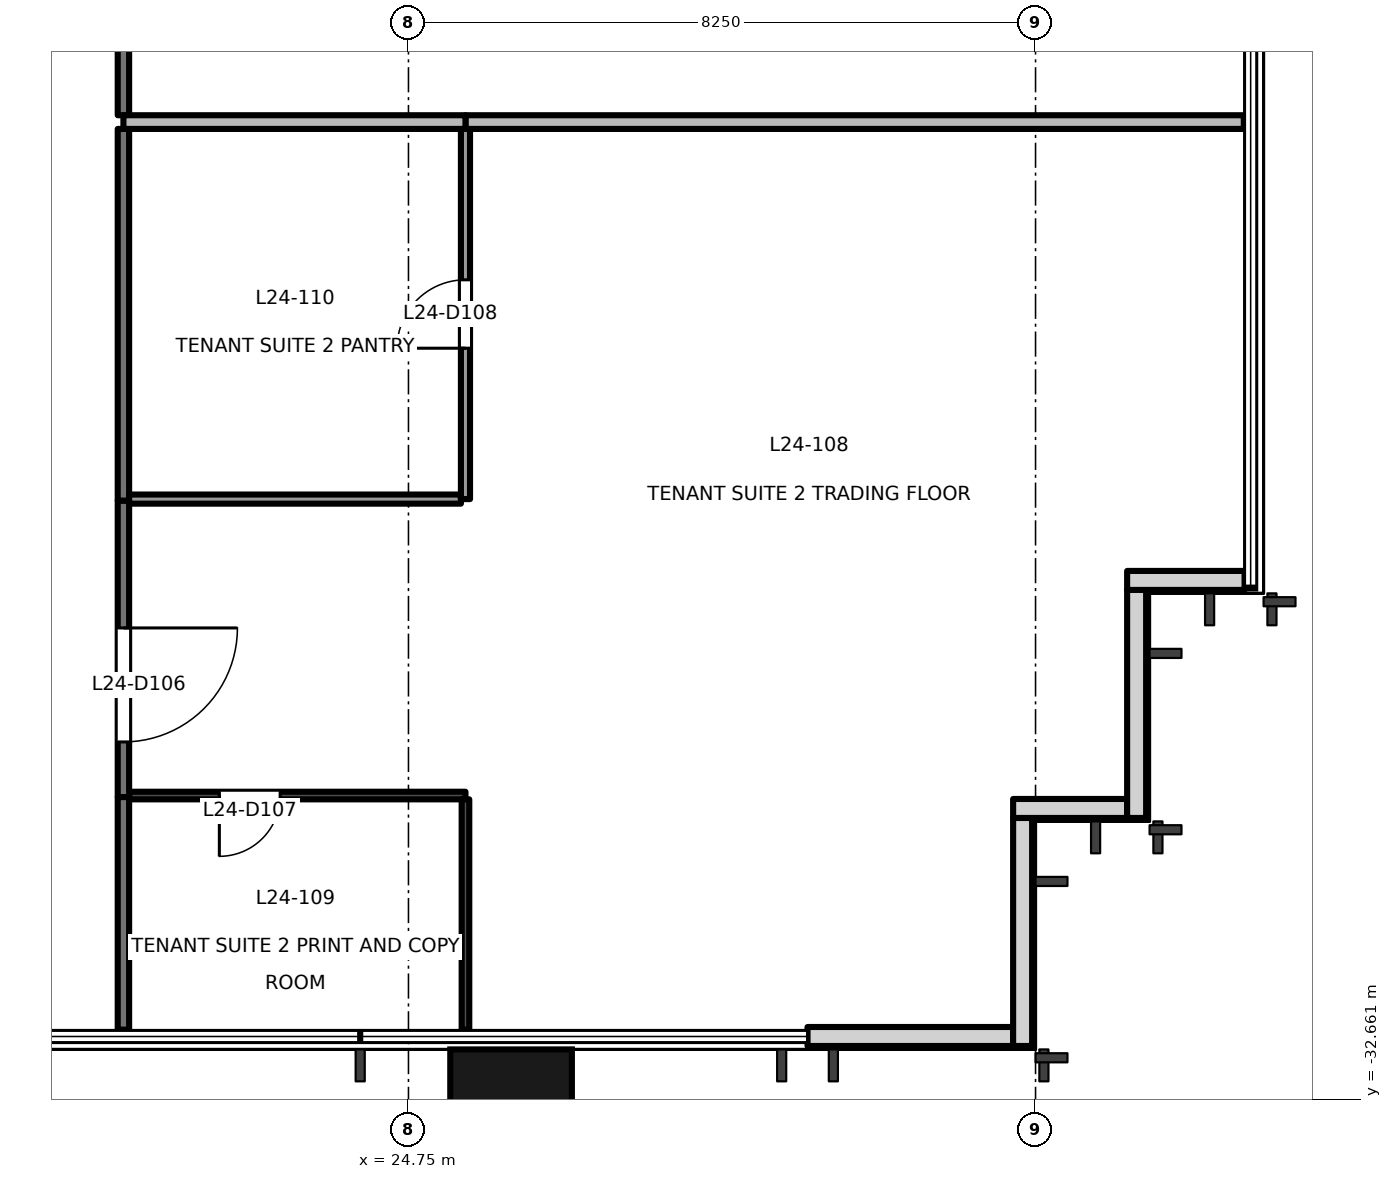
"""IFC4 building model, lengths in metres.
Left out: names, types, materials, properties, quantities, classifications, styles, units other than length and angle.
Written with IfcOpenShell. Run it as: python <this file> out.ifc"""

import sys

from ifc_helpers import new_model, si_unit, direction, frame, frame_2d, origin, origin_2d, place, context, subcontext, project, spatial, rectangle, extrude, element, fill, save


model = new_model("IFC4")
c1 = context("Model", 3, precision=1e-05, world=origin(), true_north=direction((0.0, 1.0)))
c2 = subcontext(c1, "Body", "Model", "MODEL_VIEW")
j1 = project(units=[si_unit("LENGTHUNIT", "METRE"), si_unit("PLANEANGLEUNIT", "RADIAN")], contexts=[c1])
p1 = place(None, origin())
s1 = spatial("IfcSite", under=j1, at=p1, CompositionType="ELEMENT")
p2 = place(p1, origin())
s2 = spatial("IfcBuilding", under=s1, at=p2, CompositionType="ELEMENT")
p3 = place(p2, frame((0.0, 0.0, 107.7)))
s3 = spatial("IfcBuildingStorey", under=s2, at=p3, CompositionType="ELEMENT", Elevation=107.7)
p4 = place(p3, frame((26.1, -32.9, -0.2), z_axis=(0.0, 0.0, 1.0), x_axis=(1.0, 0.0, 0.0)))
e1 = element("IfcColumn", 1, at=p4, inside=s3, PredefinedType="COLUMN", context=c2, shape_type="SweptSolid", body=[
    extrude(rectangle(XDim=1.6, YDim=1.8, at=origin_2d()), origin(), (0.0, 0.0, 1.0), 4.0),
])
p5 = place(p3, frame((30.0, -31.83, 0.0), z_axis=(0.0, 0.0, 1.0), x_axis=(1.0, 0.0, 0.0)))
e2 = element("IfcWall", 2, at=p5, inside=s3, PredefinedType="SOLIDWALL", context=c2, shape_type="SweptSolid", body=[
    extrude(rectangle(XDim=2.705, YDim=0.25, at=frame_2d((1.353, 0.0))), origin(), (0.0, 0.0, 1.0), 3.8),
])
p6 = place(p3, frame((32.83, -31.955, 0.0), z_axis=(0.0, 0.0, 1.0), x_axis=(0.0, 1.0, 0.0)))
e3 = element("IfcWall", 3, at=p6, inside=s3, PredefinedType="SOLIDWALL", context=c2, shape_type="SweptSolid", body=[
    extrude(rectangle(XDim=3.0, YDim=0.25, at=frame_2d((1.5, 0.0))), origin(), (0.0, 0.0, 1.0), 3.8),
])
p7 = place(p3, frame((32.705, -28.83, 0.0), z_axis=(0.0, 0.0, 1.0), x_axis=(1.0, 0.0, 0.0)))
e4 = element("IfcWall", 4, at=p7, inside=s3, PredefinedType="SOLIDWALL", context=c2, shape_type="SweptSolid", body=[
    extrude(rectangle(XDim=1.5, YDim=0.25, at=frame_2d((0.75, 0.0))), origin(), (0.0, 0.0, 1.0), 3.8),
])
p8 = place(p3, frame((34.33, -28.955, 0.0), z_axis=(0.0, 0.0, 1.0), x_axis=(0.0, 1.0, 0.0)))
e5 = element("IfcWall", 5, at=p8, inside=s3, PredefinedType="SOLIDWALL", context=c2, shape_type="SweptSolid", body=[
    extrude(rectangle(XDim=3.0, YDim=0.25, at=frame_2d((1.5, 0.0))), origin(), (0.0, 0.0, 1.0), 3.8),
])
p9 = place(p3, frame((34.205, -25.83, 0.0), z_axis=(0.0, 0.0, 1.0), x_axis=(1.0, 0.0, 0.0)))
e6 = element("IfcWall", 6, at=p9, inside=s3, PredefinedType="SOLIDWALL", context=c2, shape_type="SweptSolid", body=[
    extrude(rectangle(XDim=1.545, YDim=0.25, at=frame_2d((0.772, 0.0))), origin(), (0.0, 0.0, 1.0), 3.8),
])
p10 = place(p3, frame((21.0, -24.78, 0.0), z_axis=(0.0, 0.0, 1.0), x_axis=(0.0, -1.0, 0.0)))
e7 = element("IfcWall", 7, at=p10, inside=s3, PredefinedType="PARTITIONING", context=c2, shape_type="SweptSolid", body=[
    extrude(rectangle(XDim=3.9, YDim=0.15, at=frame_2d((1.95, 0.0))), origin(), (0.0, 0.0, 1.0), 3.8),
])
p11 = place(p10, frame((1.675, 0.0, 0.0)))
e8 = element("IfcOpeningElement", 8, at=p11, cuts=e7, PredefinedType="OPENING", context=c2, shape_type="SweptSolid", body=[
    extrude(rectangle(XDim=1.5, YDim=2.1, at=frame_2d((0.75, 1.05))), frame((0.0, 0.085, 0.0), z_axis=(0.0, -1.0, 0.0), x_axis=(1.0, 0.0, 0.0)), (0.0, 0.0, 1.0), 0.171),
])
p12 = place(p3, frame((21.0, -28.68, 0.0), z_axis=(0.0, 0.0, 1.0), x_axis=(0.0, -1.0, 0.0)))
e9 = element("IfcWall", 9, at=p12, inside=s3, PredefinedType="PARTITIONING", context=c2, shape_type="SweptSolid", body=[
    extrude(rectangle(XDim=3.06, YDim=0.15, at=frame_2d((1.53, 0.0))), origin(), (0.0, 0.0, 1.0), 3.8),
])
p13 = place(p3, frame((21.0, -19.89, 0.0), z_axis=(0.0, 0.0, 1.0), x_axis=(0.0, -1.0, 0.0)))
e10 = element("IfcWall", 10, at=p13, inside=s3, PredefinedType="PARTITIONING", context=c2, shape_type="SweptSolid", body=[
    extrude(rectangle(XDim=4.89, YDim=0.15, at=frame_2d((2.445, 0.0))), origin(), (0.0, 0.0, 1.0), 3.8),
])
p14 = place(p3, frame((21.0, -15.32, 0.0), z_axis=(0.0, 0.0, 1.0), x_axis=(0.0, -1.0, 0.0)))
e11 = element("IfcWall", 11, at=p14, inside=s3, PredefinedType="PARTITIONING", context=c2, shape_type="SweptSolid", body=[
    extrude(rectangle(XDim=4.39, YDim=0.15, at=frame_2d((2.195, 0.0))), origin(), (0.0, 0.0, 1.0), 3.8),
])
p15 = place(p14, frame((1.745, 0.0, 0.0)))
e12 = element("IfcOpeningElement", 12, at=p15, cuts=e11, PredefinedType="OPENING", context=c2, shape_type="SweptSolid", body=[
    extrude(rectangle(XDim=0.9, YDim=2.1, at=frame_2d((0.45, 1.05))), frame((0.0, 0.085, 0.0), z_axis=(0.0, -1.0, 0.0), x_axis=(1.0, 0.0, 0.0)), (0.0, 0.0, 1.0), 0.171),
])
p16 = place(p3, frame((25.5, -28.66, 0.0), z_axis=(0.0, 0.0, 1.0), x_axis=(-1.0, 0.0, 0.0)))
e13 = element("IfcWall", 13, at=p16, inside=s3, PredefinedType="PARTITIONING", context=c2, shape_type="SweptSolid", body=[
    extrude(rectangle(XDim=4.425, YDim=0.1, at=frame_2d((2.212, 0.0))), origin(), (0.0, 0.0, 1.0), 3.8),
])
p17 = place(p16, frame((2.438, 0.0, 0.0)))
e14 = element("IfcOpeningElement", 14, at=p17, cuts=e13, PredefinedType="OPENING", context=c2, shape_type="SweptSolid", body=[
    extrude(rectangle(XDim=0.8, YDim=2.1, at=frame_2d((0.4, 1.05))), frame((0.0, 0.061, 0.0), z_axis=(0.0, -1.0, 0.0), x_axis=(1.0, 0.0, 0.0)), (0.0, 0.0, 1.0), 0.121),
])
p18 = place(p3, frame((25.5, -31.74, 0.0), z_axis=(0.0, 0.0, 1.0), x_axis=(0.0, 1.0, 0.0)))
e15 = element("IfcWall", 15, at=p18, inside=s3, PredefinedType="PARTITIONING", context=c2, shape_type="SweptSolid", body=[
    extrude(rectangle(XDim=3.03, YDim=0.1, at=frame_2d((1.515, 0.0))), origin(), (0.0, 0.0, 1.0), 3.8),
])
p19 = place(p3, frame((21.075, -24.76, 0.0), z_axis=(0.0, 0.0, 1.0), x_axis=(1.0, 0.0, 0.0)))
e16 = element("IfcWall", 16, at=p19, inside=s3, PredefinedType="PARTITIONING", context=c2, shape_type="SweptSolid", body=[
    extrude(rectangle(XDim=4.365, YDim=0.12, at=frame_2d((2.183, 0.0))), origin(), (0.0, 0.0, 1.0), 3.8),
])
p20 = place(p3, frame((25.5, -24.76, 0.0), z_axis=(0.0, 0.0, 1.0), x_axis=(0.0, 1.0, 0.0)))
e17 = element("IfcWall", 17, at=p20, inside=s3, PredefinedType="PARTITIONING", context=c2, shape_type="SweptSolid", body=[
    extrude(rectangle(XDim=4.87, YDim=0.12, at=frame_2d((2.435, 0.0))), origin(), (0.0, 0.0, 1.0), 3.8),
])
p21 = place(p20, frame((1.985, 0.0, 0.0)))
e18 = element("IfcOpeningElement", 18, at=p21, cuts=e17, PredefinedType="OPENING", context=c2, shape_type="SweptSolid", body=[
    extrude(rectangle(XDim=0.9, YDim=2.1, at=frame_2d((0.45, 1.05))), frame((0.0, 0.071, 0.0), z_axis=(0.0, -1.0, 0.0), x_axis=(1.0, 0.0, 0.0)), (0.0, 0.0, 1.0), 0.141),
])
p22 = place(p3, frame((25.5, -19.8, 0.0), z_axis=(0.0, 0.0, 1.0), x_axis=(1.0, 0.0, 0.0)))
e19 = element("IfcWall", 19, at=p22, inside=s3, PredefinedType="PARTITIONING", context=c2, shape_type="SweptSolid", body=[
    extrude(rectangle(XDim=10.24, YDim=0.18, at=frame_2d((5.12, 0.0))), origin(), (0.0, 0.0, 1.0), 3.8),
])
p23 = place(p3, frame((21.0, -19.8, 0.0), z_axis=(0.0, 0.0, 1.0), x_axis=(1.0, 0.0, 0.0)))
e20 = element("IfcWall", 20, at=p23, inside=s3, PredefinedType="PARTITIONING", context=c2, shape_type="SweptSolid", body=[
    extrude(rectangle(XDim=4.5, YDim=0.18, at=frame_2d((2.25, 0.0))), origin(), (0.0, 0.0, 1.0), 3.8),
])
p24 = place(p11, origin())
e21 = element("IfcDoor", 21, at=p24, inside=s3, OperationType="DOUBLE_DOOR_SINGLE_SWING", PredefinedType="DOOR", context=c2, shape_type="SweptSolid", body=[
    extrude(rectangle(XDim=1.5, YDim=2.1, at=frame_2d((0.75, 1.05))), frame((0.0, 0.025, 0.0), z_axis=(0.0, -1.0, 0.0), x_axis=(1.0, 0.0, 0.0)), (0.0, 0.0, 1.0), 0.05),
])
fill(e8, e21)
p25 = place(p17, origin())
e22 = element("IfcDoor", 22, at=p25, inside=s3, OperationType="SINGLE_SWING_RIGHT", PredefinedType="DOOR", context=c2, shape_type="SweptSolid", body=[
    extrude(rectangle(XDim=0.8, YDim=2.1, at=frame_2d((0.4, 1.05))), frame((0.0, 0.025, 0.0), z_axis=(0.0, -1.0, 0.0), x_axis=(1.0, 0.0, 0.0)), (0.0, 0.0, 1.0), 0.05),
])
fill(e14, e22)
p26 = place(p21, origin())
e23 = element("IfcDoor", 23, at=p26, inside=s3, OperationType="SINGLE_SWING_LEFT", PredefinedType="DOOR", context=c2, shape_type="SweptSolid", body=[
    extrude(rectangle(XDim=0.9, YDim=2.1, at=frame_2d((0.45, 1.05))), frame((0.0, 0.025, 0.0), z_axis=(0.0, -1.0, 0.0), x_axis=(1.0, 0.0, 0.0)), (0.0, 0.0, 1.0), 0.05),
])
fill(e18, e23)
save(model, sys.argv[1])
